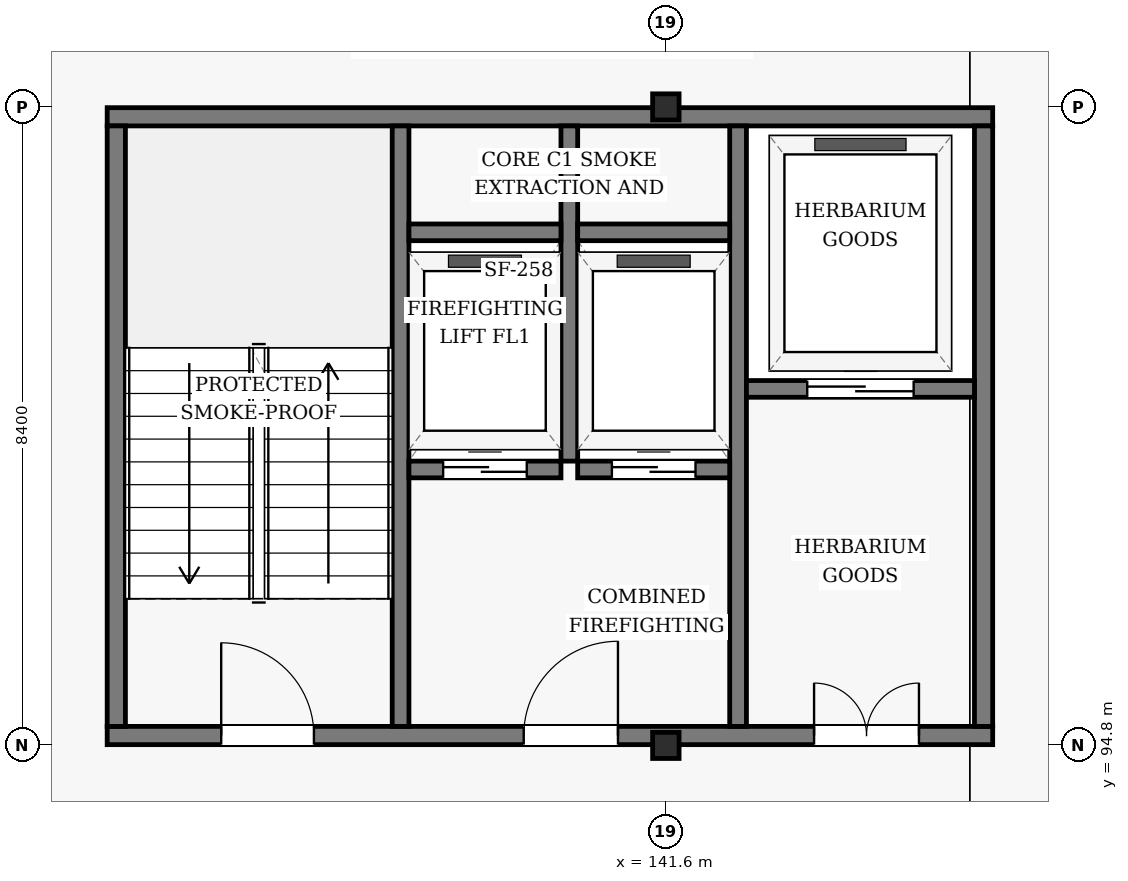
"""IFC4 building model, lengths in metres.
Left out: names, types, materials, properties, quantities, classifications, styles, units other than length and angle.
Written with IfcOpenShell. Run it as: python <this file> out.ifc"""

import sys

from ifc_helpers import new_model, si_unit, direction, frame, frame_2d, origin, origin_2d, place, context, subcontext, project, spatial, rectangle, i_section, extrude, element, fill, save


model = new_model("IFC4")
c1 = context("Model", 3, precision=1e-05, world=origin(), true_north=direction((0.0, 1.0)))
c2 = subcontext(c1, "Body", "Model", "MODEL_VIEW")
j1 = project(units=[si_unit("LENGTHUNIT", "METRE"), si_unit("PLANEANGLEUNIT", "RADIAN")], contexts=[c1])
p1 = place(None, origin())
s1 = spatial("IfcSite", under=j1, at=p1, CompositionType="ELEMENT")
p2 = place(p1, origin())
s2 = spatial("IfcBuilding", under=s1, at=p2, CompositionType="ELEMENT")
p3 = place(p2, frame((0.0, 0.0, 43.2)))
s3 = spatial("IfcBuildingStorey", under=s2, at=p3, CompositionType="ELEMENT", Elevation=43.2)
for number, where, z_axis, x_axis in (
    (1, (141.6, 94.8, 0.0), (0.0, 0.0, 1.0), (1.0, 0.0, 0.0)),
    (2, (141.6, 103.2, 0.0), (0.0, 0.0, 1.0), (1.0, 0.0, 0.0)),
):
    element("IfcColumn", number, at=place(p3, frame(where, z_axis=z_axis, x_axis=x_axis)), inside=s3, PredefinedType="COLUMN", context=c2, shape_type="SweptSolid", body=[
        extrude(i_section(OverallWidth=0.348, OverallDepth=0.344, WebThickness=0.01, FlangeThickness=0.016, FilletRadius=0.02, at=origin_2d()), origin(), (0.0, 0.0, 1.0), 3.6),
    ])
p4 = place(p3, frame((134.25, 94.93, 0.0), z_axis=(0.0, 0.0, 1.0), x_axis=(1.0, 0.0, 0.0)))
e3 = element("IfcWall", 3, at=p4, inside=s3, PredefinedType="SHEAR", context=c2, shape_type="SweptSolid", body=[
    extrude(rectangle(XDim=11.65, YDim=0.24, at=frame_2d((5.825, 0.0))), origin(), (0.0, 0.0, 1.0), 3.354),
])
p5 = place(p4, frame((1.5, 0.0, 0.0)))
e4 = element("IfcOpeningElement", 4, at=p5, cuts=e3, PredefinedType="OPENING", context=c2, shape_type="SweptSolid", body=[
    extrude(rectangle(XDim=1.22, YDim=2.18, at=frame_2d((0.61, 1.09))), frame((0.0, 0.13, 0.0), z_axis=(0.0, -1.0, 0.0), x_axis=(1.0, 0.0, 0.0)), (0.0, 0.0, 1.0), 0.26),
])
p6 = place(p4, frame((5.48, 0.0, 0.0)))
e5 = element("IfcOpeningElement", 5, at=p6, cuts=e3, PredefinedType="OPENING", context=c2, shape_type="SweptSolid", body=[
    extrude(rectangle(XDim=1.24, YDim=2.15, at=frame_2d((0.62, 1.075))), frame((0.0, 0.13, 0.0), z_axis=(0.0, -1.0, 0.0), x_axis=(1.0, 0.0, 0.0)), (0.0, 0.0, 1.0), 0.26),
])
p7 = place(p4, frame((9.3, 0.0, 0.0)))
e6 = element("IfcOpeningElement", 6, at=p7, cuts=e3, PredefinedType="OPENING", context=c2, shape_type="SweptSolid", body=[
    extrude(rectangle(XDim=1.38, YDim=2.15, at=frame_2d((0.69, 1.075))), frame((0.0, 0.13, 0.0), z_axis=(0.0, -1.0, 0.0), x_axis=(1.0, 0.0, 0.0)), (0.0, 0.0, 1.0), 0.26),
])
p8 = place(p3, frame((134.25, 103.07, 0.0), z_axis=(0.0, 0.0, 1.0), x_axis=(1.0, 0.0, 0.0)))
e7 = element("IfcWall", 7, at=p8, inside=s3, PredefinedType="SHEAR", context=c2, shape_type="SweptSolid", body=[
    extrude(rectangle(XDim=11.65, YDim=0.24, at=frame_2d((5.825, 0.0))), origin(), (0.0, 0.0, 1.0), 3.354),
])
p9 = place(p3, frame((134.37, 95.05, 0.0), z_axis=(0.0, 0.0, 1.0), x_axis=(0.0, 1.0, 0.0)))
e8 = element("IfcWall", 8, at=p9, inside=s3, PredefinedType="SHEAR", context=c2, shape_type="SweptSolid", body=[
    extrude(rectangle(XDim=7.9, YDim=0.24, at=frame_2d((3.95, 0.0))), origin(), (0.0, 0.0, 1.0), 3.354),
])
p10 = place(p3, frame((138.11, 95.05, 0.0), z_axis=(0.0, 0.0, 1.0), x_axis=(0.0, 1.0, 0.0)))
e9 = element("IfcWall", 9, at=p10, inside=s3, PredefinedType="SHEAR", context=c2, shape_type="SweptSolid", body=[
    extrude(rectangle(XDim=7.9, YDim=0.22, at=frame_2d((3.95, 0.0))), origin(), (0.0, 0.0, 1.0), 3.354),
])
p11 = place(p3, frame((140.33, 98.54, 0.0), z_axis=(0.0, 0.0, 1.0), x_axis=(0.0, 1.0, 0.0)))
e10 = element("IfcWall", 10, at=p11, inside=s3, PredefinedType="SHEAR", context=c2, shape_type="SweptSolid", body=[
    extrude(rectangle(XDim=4.41, YDim=0.22, at=frame_2d((2.205, 0.0))), origin(), (0.0, 0.0, 1.0), 3.354),
])
p12 = place(p3, frame((142.55, 95.05, 0.0), z_axis=(0.0, 0.0, 1.0), x_axis=(0.0, 1.0, 0.0)))
e11 = element("IfcWall", 11, at=p12, inside=s3, PredefinedType="SHEAR", context=c2, shape_type="SweptSolid", body=[
    extrude(rectangle(XDim=7.9, YDim=0.22, at=frame_2d((3.95, 0.0))), origin(), (0.0, 0.0, 1.0), 3.354),
])
p13 = place(p3, frame((145.78, 95.05, 0.0), z_axis=(0.0, 0.0, 1.0), x_axis=(0.0, 1.0, 0.0)))
e12 = element("IfcWall", 12, at=p13, inside=s3, PredefinedType="SHEAR", context=c2, shape_type="SweptSolid", body=[
    extrude(rectangle(XDim=7.9, YDim=0.24, at=frame_2d((3.95, 0.0))), origin(), (0.0, 0.0, 1.0), 3.354),
])
p14 = place(p3, frame((138.22, 98.43, 0.0), z_axis=(0.0, 0.0, 1.0), x_axis=(1.0, 0.0, 0.0)))
e13 = element("IfcWall", 13, at=p14, inside=s3, PredefinedType="SHEAR", context=c2, shape_type="SweptSolid", body=[
    extrude(rectangle(XDim=2.0, YDim=0.22, at=frame_2d((1.0, 0.0))), origin(), (0.0, 0.0, 1.0), 3.354),
])
p15 = place(p14, frame((0.45, 0.0, 0.0)))
e14 = element("IfcOpeningElement", 14, at=p15, cuts=e13, PredefinedType="OPENING", context=c2, shape_type="SweptSolid", body=[
    extrude(rectangle(XDim=1.1, YDim=2.15, at=frame_2d((0.55, 1.075))), frame((0.0, 0.12, 0.0), z_axis=(0.0, -1.0, 0.0), x_axis=(1.0, 0.0, 0.0)), (0.0, 0.0, 1.0), 0.24),
])
p16 = place(p3, frame((140.44, 98.43, 0.0), z_axis=(0.0, 0.0, 1.0), x_axis=(1.0, 0.0, 0.0)))
e15 = element("IfcWall", 15, at=p16, inside=s3, PredefinedType="SHEAR", context=c2, shape_type="SweptSolid", body=[
    extrude(rectangle(XDim=2.0, YDim=0.22, at=frame_2d((1.0, 0.0))), origin(), (0.0, 0.0, 1.0), 3.354),
])
p17 = place(p16, frame((0.45, 0.0, 0.0)))
e16 = element("IfcOpeningElement", 16, at=p17, cuts=e15, PredefinedType="OPENING", context=c2, shape_type="SweptSolid", body=[
    extrude(rectangle(XDim=1.1, YDim=2.15, at=frame_2d((0.55, 1.075))), frame((0.0, 0.12, 0.0), z_axis=(0.0, -1.0, 0.0), x_axis=(1.0, 0.0, 0.0)), (0.0, 0.0, 1.0), 0.24),
])
for number, where, z_axis, x_axis in (
    (17, (138.22, 101.55, 0.0), (0.0, 0.0, 1.0), (1.0, 0.0, 0.0)),
    (18, (140.44, 101.55, 0.0), (0.0, 0.0, 1.0), (1.0, 0.0, 0.0)),
):
    element("IfcWall", number, at=place(p3, frame(where, z_axis=z_axis, x_axis=x_axis)), inside=s3, PredefinedType="SHEAR", context=c2, shape_type="SweptSolid", body=[
        extrude(rectangle(XDim=2.0, YDim=0.22, at=frame_2d((1.0, 0.0))), origin(), (0.0, 0.0, 1.0), 3.354),
    ])
p18 = place(p3, frame((142.66, 99.49, 0.0), z_axis=(0.0, 0.0, 1.0), x_axis=(1.0, 0.0, 0.0)))
e19 = element("IfcWall", 19, at=p18, inside=s3, PredefinedType="SHEAR", context=c2, shape_type="SweptSolid", body=[
    extrude(rectangle(XDim=3.0, YDim=0.22, at=frame_2d((1.5, 0.0))), origin(), (0.0, 0.0, 1.0), 3.354),
])
p19 = place(p18, frame((0.8, 0.0, 0.0)))
e20 = element("IfcOpeningElement", 20, at=p19, cuts=e19, PredefinedType="OPENING", context=c2, shape_type="SweptSolid", body=[
    extrude(rectangle(XDim=1.4, YDim=2.2, at=frame_2d((0.7, 1.1))), frame((0.0, 0.12, 0.0), z_axis=(0.0, -1.0, 0.0), x_axis=(1.0, 0.0, 0.0)), (0.0, 0.0, 1.0), 0.24),
])
p20 = place(p5, origin())
e21 = element("IfcDoor", 21, at=p20, inside=s3, OperationType="SINGLE_SWING_LEFT", PredefinedType="DOOR", context=c2, shape_type="SweptSolid", body=[
    extrude(rectangle(XDim=1.22, YDim=2.18, at=frame_2d((0.61, 1.09))), frame((0.0, 0.025, 0.0), z_axis=(0.0, -1.0, 0.0), x_axis=(1.0, 0.0, 0.0)), (0.0, 0.0, 1.0), 0.05),
])
fill(e4, e21)
p21 = place(p6, frame((1.24, 0.0, 0.0), z_axis=(0.0, 0.0, 1.0), x_axis=(-1.0, 0.0, 0.0)))
e22 = element("IfcDoor", 22, at=p21, inside=s3, OperationType="SINGLE_SWING_RIGHT", PredefinedType="DOOR", context=c2, shape_type="SweptSolid", body=[
    extrude(rectangle(XDim=1.24, YDim=2.15, at=frame_2d((0.62, 1.075))), frame((0.0, 0.025, 0.0), z_axis=(0.0, -1.0, 0.0), x_axis=(1.0, 0.0, 0.0)), (0.0, 0.0, 1.0), 0.05),
])
fill(e5, e22)
p22 = place(p7, frame((1.38, 0.0, 0.0), z_axis=(0.0, 0.0, 1.0), x_axis=(-1.0, 0.0, 0.0)))
e23 = element("IfcDoor", 23, at=p22, inside=s3, OperationType="DOUBLE_DOOR_SINGLE_SWING", PredefinedType="DOOR", context=c2, shape_type="SweptSolid", body=[
    extrude(rectangle(XDim=1.38, YDim=2.15, at=frame_2d((0.69, 1.075))), frame((0.0, 0.025, 0.0), z_axis=(0.0, -1.0, 0.0), x_axis=(1.0, 0.0, 0.0)), (0.0, 0.0, 1.0), 0.05),
])
fill(e6, e23)
p23 = place(p15, origin())
e24 = element("IfcDoor", 24, at=p23, inside=s3, OperationType="SLIDING_TO_LEFT", PredefinedType="DOOR", context=c2, shape_type="SweptSolid", body=[
    extrude(rectangle(XDim=1.1, YDim=2.15, at=frame_2d((0.55, 1.075))), frame((0.0, 0.025, 0.0), z_axis=(0.0, -1.0, 0.0), x_axis=(1.0, 0.0, 0.0)), (0.0, 0.0, 1.0), 0.05),
])
fill(e14, e24)
p24 = place(p17, origin())
e25 = element("IfcDoor", 25, at=p24, inside=s3, OperationType="SLIDING_TO_LEFT", PredefinedType="DOOR", context=c2, shape_type="SweptSolid", body=[
    extrude(rectangle(XDim=1.1, YDim=2.15, at=frame_2d((0.55, 1.075))), frame((0.0, 0.025, 0.0), z_axis=(0.0, -1.0, 0.0), x_axis=(1.0, 0.0, 0.0)), (0.0, 0.0, 1.0), 0.05),
])
fill(e16, e25)
p25 = place(p19, origin())
e26 = element("IfcDoor", 26, at=p25, inside=s3, OperationType="SLIDING_TO_LEFT", PredefinedType="DOOR", context=c2, shape_type="SweptSolid", body=[
    extrude(rectangle(XDim=1.4, YDim=2.2, at=frame_2d((0.7, 1.1))), frame((0.0, 0.025, 0.0), z_axis=(0.0, -1.0, 0.0), x_axis=(1.0, 0.0, 0.0)), (0.0, 0.0, 1.0), 0.05),
])
fill(e20, e26)
save(model, sys.argv[1])
